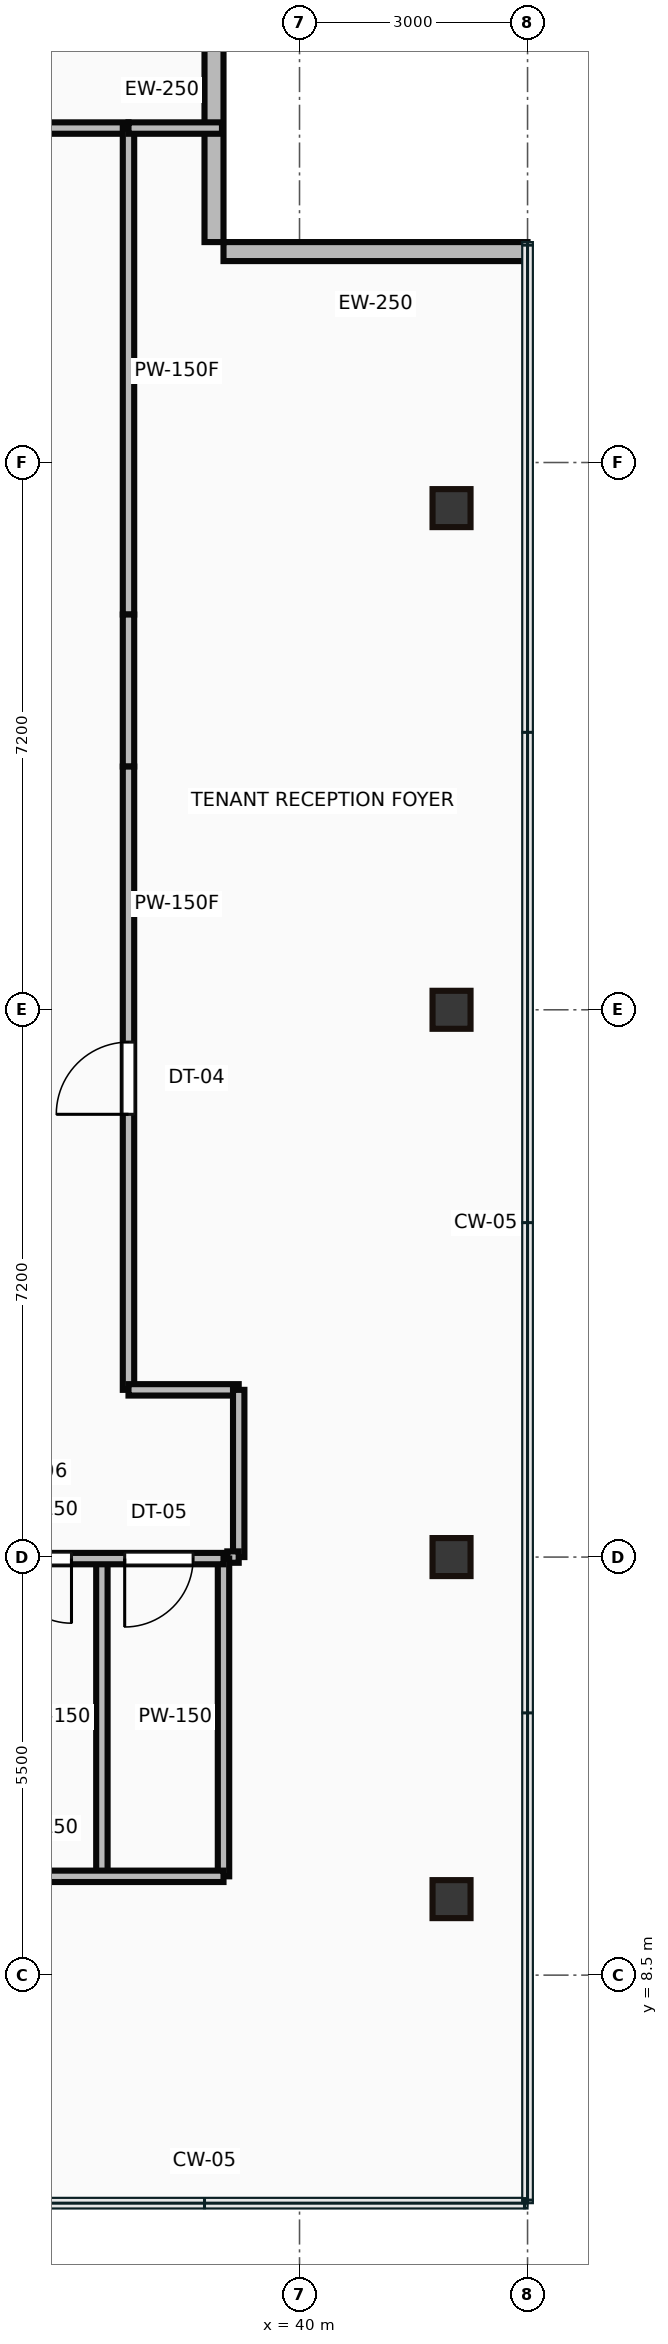
"""IFC4 building model, lengths in metres.
Left out: names, types, materials, properties, quantities, classifications, styles, units other than length and angle.
Written with IfcOpenShell. Run it as: python <this file> out.ifc"""

import sys

from ifc_helpers import new_model, si_unit, direction, frame, frame_2d, origin, origin_2d, place, context, subcontext, project, spatial, rectangle, hollow_rectangle, extrude, source, transform, mapped, element, fill, save


model = new_model("IFC4")
c1 = context("Model", 3, precision=1e-05, world=origin(), true_north=direction((0.0, 1.0)))
c2 = subcontext(c1, "Body", "Model", "MODEL_VIEW")
j1 = project(units=[si_unit("LENGTHUNIT", "METRE"), si_unit("PLANEANGLEUNIT", "RADIAN")], contexts=[c1])
p1 = place(None, origin())
s1 = spatial("IfcSite", under=j1, at=p1, CompositionType="ELEMENT")
p2 = place(p1, origin())
s2 = spatial("IfcBuilding", under=s1, at=p2, CompositionType="ELEMENT")
p3 = place(p2, frame((0.0, 0.0, 258.8)))
s3 = spatial("IfcBuildingStorey", under=s2, at=p3, CompositionType="ELEMENT", Elevation=258.8)
m1 = source(origin(), c2, "Body", "SweptSolid", [
    extrude(hollow_rectangle(XDim=0.5, YDim=0.5, WallThickness=0.022, at=origin_2d()), origin(), (0.0, 0.0, 1.0), 3.65),
])
for number, where, z_axis, x_axis in (
    (1, (42.0, 9.5, 0.0), (0.0, 0.0, 1.0), (1.0, 0.0, 0.0)),
    (2, (42.0, 14.0, 0.0), (0.0, 0.0, 1.0), (1.0, 0.0, 0.0)),
    (3, (42.0, 21.2, 0.0), (0.0, 0.0, 1.0), (1.0, 0.0, 0.0)),
    (4, (42.0, 27.8, 0.0), (0.0, 0.0, 1.0), (1.0, 0.0, 0.0)),
):
    element("IfcColumn", number, at=place(p3, frame(where, z_axis=z_axis, x_axis=x_axis)), inside=s3, PredefinedType="COLUMN", context=c2, shape_type="MappedRepresentation", body=[
        mapped(m1, transform((0.0, 0.0, 0.0))),
    ])
m2 = source(origin(), c2, "Body", "SweptSolid", [
    extrude(rectangle(XDim=4.0, YDim=0.25, at=frame_2d((2.0, 0.0))), origin(), (0.0, 0.0, 1.0), 3.4),
])
for number, where, z_axis, x_axis in (
    (5, (43.0, 31.175, 0.0), (0.0, 0.0, 1.0), (-1.0, 0.0, 0.0)),
    (6, (38.875, 31.3, 0.0), (0.0, 0.0, 1.0), (0.0, 1.0, 0.0)),
):
    element("IfcWall", number, at=place(p3, frame(where, z_axis=z_axis, x_axis=x_axis)), inside=s3, PredefinedType="STANDARD", context=c2, shape_type="MappedRepresentation", body=[
        mapped(m2, transform((0.0, 0.0, 0.0))),
    ])
m3 = source(origin(), c2, "Body", "SweptSolid", [
    extrude(rectangle(XDim=4.8, YDim=0.15, at=frame_2d((2.4, 0.0))), origin(), (0.0, 0.0, 1.0), 2.787),
])
p4 = place(p3, frame((34.2, 13.98, 0.0), z_axis=(0.0, 0.0, 1.0), x_axis=(1.0, 0.0, 0.0)))
e7 = element("IfcWall", 7, at=p4, inside=s3, PredefinedType="PARTITIONING", context=c2, shape_type="MappedRepresentation", body=[
    mapped(m3, transform((0.0, 0.0, 0.0))),
])
p5 = place(p4, frame((0.35, 0.0, 0.0)))
e8 = element("IfcOpeningElement", 8, at=p5, cuts=e7, PredefinedType="OPENING", context=c2, shape_type="SweptSolid", body=[
    extrude(rectangle(XDim=0.85, YDim=2.1, at=frame_2d((0.425, 1.05))), frame((0.0, 0.085, 0.0), z_axis=(0.0, -1.0, 0.0), x_axis=(1.0, 0.0, 0.0)), (0.0, 0.0, 1.0), 0.17),
])
p6 = place(p4, frame((1.95, 0.0, 0.0)))
e9 = element("IfcOpeningElement", 9, at=p6, cuts=e7, PredefinedType="OPENING", context=c2, shape_type="SweptSolid", body=[
    extrude(rectangle(XDim=0.85, YDim=2.1, at=frame_2d((0.425, 1.05))), frame((0.0, 0.085, 0.0), z_axis=(0.0, -1.0, 0.0), x_axis=(1.0, 0.0, 0.0)), (0.0, 0.0, 1.0), 0.17),
])
p7 = place(p4, frame((3.5, 0.0, 0.0)))
e10 = element("IfcOpeningElement", 10, at=p7, cuts=e7, PredefinedType="OPENING", context=c2, shape_type="SweptSolid", body=[
    extrude(rectangle(XDim=0.9, YDim=2.1, at=frame_2d((0.45, 1.05))), frame((0.0, 0.085, 0.0), z_axis=(0.0, -1.0, 0.0), x_axis=(1.0, 0.0, 0.0)), (0.0, 0.0, 1.0), 0.17),
])
m4 = source(origin(), c2, "Body", "SweptSolid", [
    extrude(rectangle(XDim=4.8, YDim=0.15, at=frame_2d((2.4, 0.0))), origin(), (0.0, 0.0, 1.0), 3.4),
])
p8 = place(p3, frame((34.2, 9.8, 0.0), z_axis=(0.0, 0.0, 1.0), x_axis=(1.0, 0.0, 0.0)))
e11 = element("IfcWall", 11, at=p8, inside=s3, PredefinedType="PARTITIONING", context=c2, shape_type="MappedRepresentation", body=[
    mapped(m4, transform((0.0, 0.0, 0.0))),
])
m5 = source(origin(), c2, "Body", "SweptSolid", [
    extrude(rectangle(XDim=4.18, YDim=0.15, at=frame_2d((2.09, 0.0))), origin(), (0.0, 0.0, 1.0), 3.4),
])
for number, where, z_axis, x_axis in (
    (12, (39.0, 9.8, 0.0), (0.0, 0.0, 1.0), (0.0, 1.0, 0.0)),
    (13, (37.4, 9.8, 0.0), (0.0, 0.0, 1.0), (0.0, 1.0, 0.0)),
):
    element("IfcWall", number, at=place(p3, frame(where, z_axis=z_axis, x_axis=x_axis)), inside=s3, PredefinedType="PARTITIONING", context=c2, shape_type="MappedRepresentation", body=[
        mapped(m5, transform((0.0, 0.0, 0.0))),
    ])
m6 = source(origin(), c2, "Body", "SweptSolid", [
    extrude(rectangle(XDim=2.15, YDim=0.15, at=frame_2d((1.075, 0.0))), origin(), (0.0, 0.0, 1.0), 3.4),
])
p9 = place(p3, frame((35.6, 32.8, 0.0), z_axis=(0.0, 0.0, 1.0), x_axis=(1.0, 0.0, 0.0)))
e14 = element("IfcWall", 14, at=p9, inside=s3, PredefinedType="PARTITIONING", context=c2, shape_type="MappedRepresentation", body=[
    mapped(m6, transform((0.0, 0.0, 0.0))),
])
m7 = source(origin(), c2, "Body", "SweptSolid", [
    extrude(rectangle(XDim=6.4, YDim=0.15, at=frame_2d((3.2, 0.0))), origin(), (0.0, 0.0, 1.0), 3.4),
])
p10 = place(p3, frame((37.75, 32.8, 0.0), z_axis=(0.0, 0.0, 1.0), x_axis=(0.0, -1.0, 0.0)))
e15 = element("IfcWall", 15, at=p10, inside=s3, PredefinedType="PARTITIONING", context=c2, shape_type="MappedRepresentation", body=[
    mapped(m7, transform((0.0, 0.0, 0.0))),
])
m8 = source(origin(), c2, "Body", "SweptSolid", [
    extrude(rectangle(XDim=2.0, YDim=0.15, at=frame_2d((1.0, 0.0))), origin(), (0.0, 0.0, 1.0), 3.4),
])
p11 = place(p3, frame((37.75, 26.4, 0.0), z_axis=(0.0, 0.0, 1.0), x_axis=(0.0, -1.0, 0.0)))
e16 = element("IfcWall", 16, at=p11, inside=s3, PredefinedType="PARTITIONING", context=c2, shape_type="MappedRepresentation", body=[
    mapped(m8, transform((0.0, 0.0, 0.0))),
])
m9 = source(origin(), c2, "Body", "SweptSolid", [
    extrude(rectangle(XDim=8.2, YDim=0.15, at=frame_2d((4.1, 0.0))), origin(), (0.0, 0.0, 1.0), 3.4),
])
p12 = place(p3, frame((37.75, 24.4, 0.0), z_axis=(0.0, 0.0, 1.0), x_axis=(0.0, -1.0, 0.0)))
e17 = element("IfcWall", 17, at=p12, inside=s3, PredefinedType="PARTITIONING", context=c2, shape_type="MappedRepresentation", body=[
    mapped(m9, transform((0.0, 0.0, 0.0))),
])
p13 = place(p12, frame((3.625, 0.0, 0.0)))
e18 = element("IfcOpeningElement", 18, at=p13, cuts=e17, PredefinedType="OPENING", context=c2, shape_type="SweptSolid", body=[
    extrude(rectangle(XDim=0.95, YDim=2.15, at=frame_2d((0.475, 1.075))), frame((0.0, 0.085, 0.0), z_axis=(0.0, -1.0, 0.0), x_axis=(1.0, 0.0, 0.0)), (0.0, 0.0, 1.0), 0.17),
])
m10 = source(origin(), c2, "Body", "SweptSolid", [
    extrude(rectangle(XDim=1.45, YDim=0.15, at=frame_2d((0.725, 0.0))), origin(), (0.0, 0.0, 1.0), 3.4),
])
p14 = place(p3, frame((37.75, 16.2, 0.0), z_axis=(0.0, 0.0, 1.0), x_axis=(1.0, 0.0, 0.0)))
e19 = element("IfcWall", 19, at=p14, inside=s3, PredefinedType="PARTITIONING", context=c2, shape_type="MappedRepresentation", body=[
    mapped(m10, transform((0.0, 0.0, 0.0))),
])
m11 = source(origin(), c2, "Body", "SweptSolid", [
    extrude(rectangle(XDim=2.2, YDim=0.15, at=frame_2d((1.1, 0.0))), origin(), (0.0, 0.0, 1.0), 3.4),
])
p15 = place(p3, frame((39.2, 16.2, 0.0), z_axis=(0.0, 0.0, 1.0), x_axis=(0.0, -1.0, 0.0)))
e20 = element("IfcWall", 20, at=p15, inside=s3, PredefinedType="PARTITIONING", context=c2, shape_type="MappedRepresentation", body=[
    mapped(m11, transform((0.0, 0.0, 0.0))),
])
m12 = source(origin(), c2, "Body", "SweptSolid", [
    extrude(rectangle(XDim=0.15, YDim=0.15, at=frame_2d((0.075, 0.0))), origin(), (0.0, 0.0, 1.0), 3.4),
])
p16 = place(p3, frame((39.2, 14.0, 0.0), z_axis=(0.0, 0.0, 1.0), x_axis=(-1.0, 0.0, 0.0)))
e21 = element("IfcWall", 21, at=p16, inside=s3, PredefinedType="PARTITIONING", context=c2, shape_type="MappedRepresentation", body=[
    mapped(m12, transform((0.0, 0.0, 0.0))),
])
m13 = source(origin(), c2, "Body", "SweptSolid", [
    extrude(rectangle(XDim=1.23, YDim=0.15, at=frame_2d((0.615, 0.0))), origin(), (0.0, 0.0, 1.0), 3.4),
])
p17 = place(p3, frame((38.98, 32.8, 0.0), z_axis=(0.0, 0.0, 1.0), x_axis=(-1.0, 0.0, 0.0)))
e22 = element("IfcWall", 22, at=p17, inside=s3, PredefinedType="PARTITIONING", context=c2, shape_type="MappedRepresentation", body=[
    mapped(m13, transform((0.0, 0.0, 0.0))),
])
m14 = source(origin(), c2, "Body", "SweptSolid", [
    extrude(rectangle(XDim=0.85, YDim=2.1, at=frame_2d((0.425, 1.05))), frame((0.0, 0.025, 0.0), z_axis=(0.0, -1.0, 0.0), x_axis=(1.0, 0.0, 0.0)), (0.0, 0.0, 1.0), 0.05),
])
p18 = place(p6, frame((0.85, 0.0, 0.0), z_axis=(0.0, 0.0, 1.0), x_axis=(-1.0, 0.0, 0.0)))
e23 = element("IfcDoor", 23, at=p18, inside=s3, OperationType="SINGLE_SWING_RIGHT", PredefinedType="DOOR", context=c2, shape_type="MappedRepresentation", body=[
    mapped(m14, transform((0.0, 0.0, 0.0))),
])
fill(e9, e23)
m15 = source(origin(), c2, "Body", "SweptSolid", [
    extrude(rectangle(XDim=0.9, YDim=2.1, at=frame_2d((0.45, 1.05))), frame((0.0, 0.025, 0.0), z_axis=(0.0, -1.0, 0.0), x_axis=(1.0, 0.0, 0.0)), (0.0, 0.0, 1.0), 0.05),
])
p19 = place(p7, frame((0.9, 0.0, 0.0), z_axis=(0.0, 0.0, 1.0), x_axis=(-1.0, 0.0, 0.0)))
e24 = element("IfcDoor", 24, at=p19, inside=s3, OperationType="SINGLE_SWING_LEFT", PredefinedType="DOOR", context=c2, shape_type="MappedRepresentation", body=[
    mapped(m15, transform((0.0, 0.0, 0.0))),
])
fill(e10, e24)
m16 = source(origin(), c2, "Body", "SweptSolid", [
    extrude(rectangle(XDim=0.95, YDim=2.15, at=frame_2d((0.475, 1.075))), frame((0.0, 0.025, 0.0), z_axis=(0.0, -1.0, 0.0), x_axis=(1.0, 0.0, 0.0)), (0.0, 0.0, 1.0), 0.05),
])
p20 = place(p13, origin())
e25 = element("IfcDoor", 25, at=p20, inside=s3, OperationType="SINGLE_SWING_RIGHT", PredefinedType="DOOR", context=c2, shape_type="MappedRepresentation", body=[
    mapped(m16, transform((0.0, 0.0, 0.0))),
])
fill(e18, e25)
save(model, sys.argv[1])
